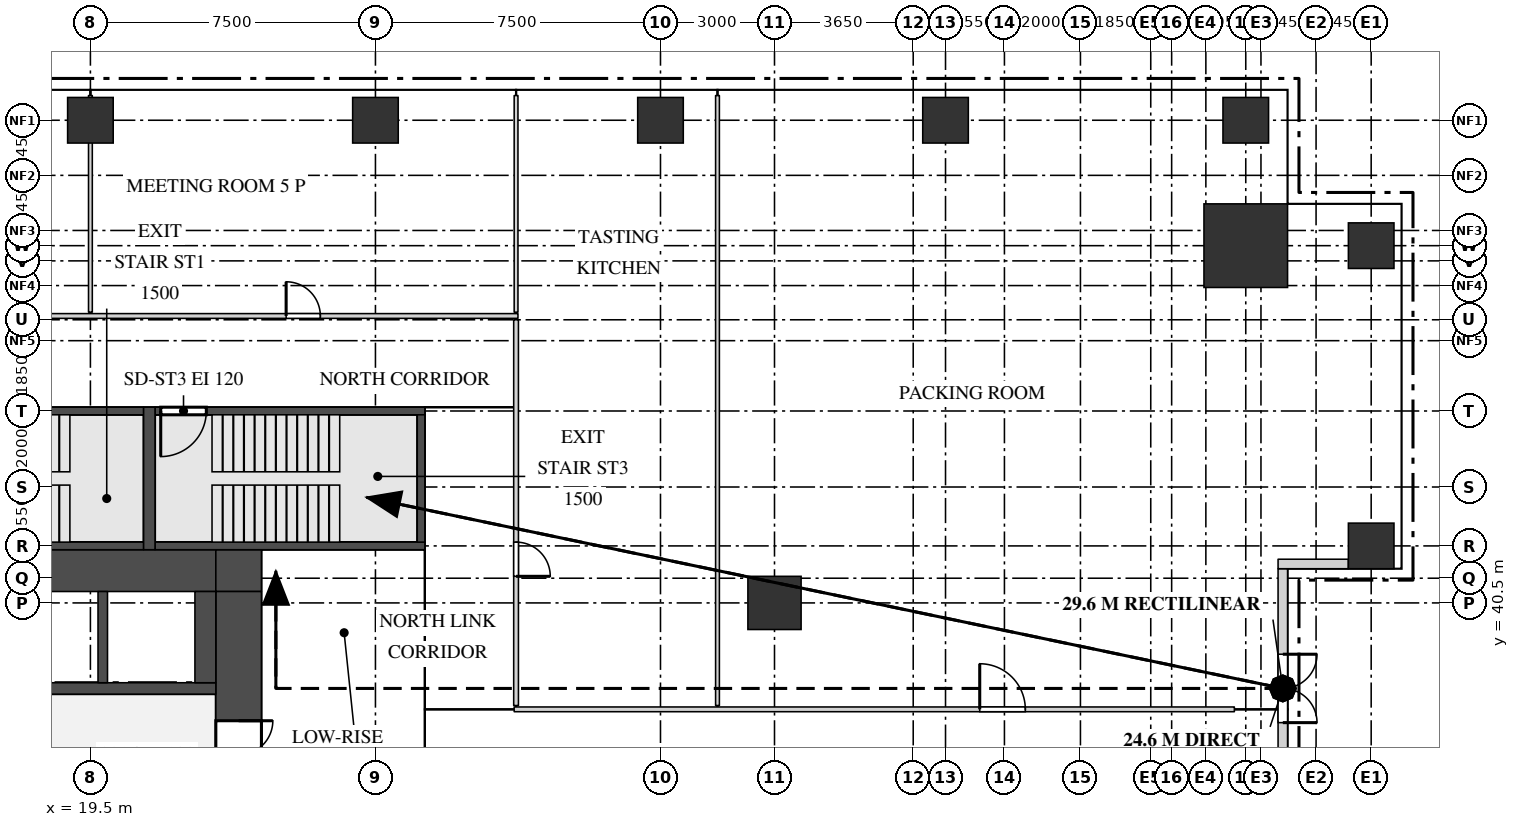
"""IFC4 building model, lengths in metres.
Left out: names, types, materials, properties, quantities, classifications, styles, units other than length and angle.
Written with IfcOpenShell. Run it as: python <this file> out.ifc"""

import sys

from ifc_helpers import new_model, si_unit, direction, frame, frame_2d, origin, origin_2d, place, context, subcontext, project, spatial, rectangle, extrude, source, transform, mapped, element, fill, save


model = new_model("IFC4")
c1 = context("Model", 3, precision=1e-05, world=origin(), true_north=direction((0.0, 1.0)))
c2 = subcontext(c1, "Body", "Model", "MODEL_VIEW")
j1 = project(units=[si_unit("LENGTHUNIT", "METRE"), si_unit("PLANEANGLEUNIT", "RADIAN")], contexts=[c1])
p1 = place(None, origin())
s1 = spatial("IfcSite", under=j1, at=p1, CompositionType="ELEMENT")
p2 = place(p1, origin())
s2 = spatial("IfcBuilding", under=s1, at=p2, CompositionType="ELEMENT")
p3 = place(p2, frame((0.0, 0.0, 60.0)))
s3 = spatial("IfcBuildingStorey", under=s2, at=p3, CompositionType="ELEMENT", Elevation=60.0)
m1 = source(origin(), c2, "Body", "SweptSolid", [
    extrude(rectangle(XDim=8.9, YDim=1.1, at=frame_2d((4.45, 0.0))), origin(), (0.0, 0.0, 1.0), 4.2),
])
p4 = place(p3, frame((13.9, 41.35, 0.0), z_axis=(0.0, 0.0, 1.0), x_axis=(1.0, 0.0, 0.0)))
e1 = element("IfcWall", 1, at=p4, inside=s3, PredefinedType="SHEAR", context=c2, shape_type="MappedRepresentation", body=[
    mapped(m1, transform((0.0, 0.0, 0.0))),
])
m2 = source(origin(), c2, "Body", "SweptSolid", [
    extrude(rectangle(XDim=1.2, YDim=1.1, at=frame_2d((0.6, 0.0))), origin(), (0.0, 0.0, 1.0), 4.2),
])
p5 = place(p3, frame((22.8, 41.35, 0.0), z_axis=(0.0, 0.0, 1.0), x_axis=(1.0, 0.0, 0.0)))
e2 = element("IfcWall", 2, at=p5, inside=s3, PredefinedType="SHEAR", context=c2, shape_type="MappedRepresentation", body=[
    mapped(m2, transform((0.0, 0.0, 0.0))),
])
m3 = source(origin(), c2, "Body", "SweptSolid", [
    extrude(rectangle(XDim=27.6, YDim=1.2, at=frame_2d((13.8, 0.0))), origin(), (0.0, 0.0, 1.0), 4.2),
])
p6 = place(p3, frame((23.4, 13.2, 0.0), z_axis=(0.0, 0.0, 1.0), x_axis=(0.0, 1.0, 0.0)))
e3 = element("IfcWall", 3, at=p6, inside=s3, PredefinedType="SHEAR", context=c2, shape_type="MappedRepresentation", body=[
    mapped(m3, transform((0.0, 0.0, 0.0))),
])
m4 = source(origin(), c2, "Body", "SweptSolid", [
    extrude(rectangle(XDim=1.8, YDim=2.1, at=frame_2d((0.9, 1.05))), frame((0.0, 0.61, 0.0), z_axis=(0.0, -1.0, 0.0), x_axis=(1.0, 0.0, 0.0)), (0.0, 0.0, 1.0), 1.22),
])
p7 = place(p6, frame((22.4, 0.0, 0.0)))
e4 = element("IfcOpeningElement", 4, at=p7, cuts=e3, PredefinedType="OPENING", context=c2, shape_type="MappedRepresentation", body=[
    mapped(m4, transform((0.0, 0.0, 0.0))),
])
m5 = source(origin(), c2, "Body", "SweptSolid", [
    extrude(rectangle(XDim=1.2, YDim=2.1, at=frame_2d((0.6, 1.05))), frame((0.0, 0.61, 0.0), z_axis=(0.0, -1.0, 0.0), x_axis=(1.0, 0.0, 0.0)), (0.0, 0.0, 1.0), 1.22),
])
p8 = place(p6, frame((12.15, 0.0, 0.0)))
e5 = element("IfcOpeningElement", 5, at=p8, cuts=e3, PredefinedType="OPENING", context=c2, shape_type="MappedRepresentation", body=[
    mapped(m5, transform((0.0, 0.0, 0.0))),
])
m6 = source(origin(), c2, "Body", "SweptSolid", [
    extrude(rectangle(XDim=0.9, YDim=2.1, at=frame_2d((0.45, 1.05))), frame((0.0, 0.61, 0.0), z_axis=(0.0, -1.0, 0.0), x_axis=(1.0, 0.0, 0.0)), (0.0, 0.0, 1.0), 1.22),
])
p9 = place(p6, frame((4.4, 0.0, 0.0)))
e6 = element("IfcOpeningElement", 6, at=p9, cuts=e3, PredefinedType="OPENING", context=c2, shape_type="MappedRepresentation", body=[
    mapped(m6, transform((0.0, 0.0, 0.0))),
])
m7 = source(origin(), c2, "Body", "SweptSolid", [
    extrude(rectangle(XDim=7.0, YDim=0.2, at=frame_2d((3.5, 0.0))), origin(), (0.0, 0.0, 1.0), 4.2),
])
p10 = place(p3, frame((13.9, 45.55, 0.0), z_axis=(0.0, 0.0, 1.0), x_axis=(1.0, 0.0, 0.0)))
e7 = element("IfcWall", 7, at=p10, inside=s3, PredefinedType="SHEAR", context=c2, shape_type="MappedRepresentation", body=[
    mapped(m7, transform((0.0, 0.0, 0.0))),
])
m8 = source(origin(), c2, "Body", "SweptSolid", [
    extrude(rectangle(XDim=1.2, YDim=2.1, at=frame_2d((0.6, 1.05))), frame((0.0, 0.11, 0.0), z_axis=(0.0, -1.0, 0.0), x_axis=(1.0, 0.0, 0.0)), (0.0, 0.0, 1.0), 0.22),
])
p11 = place(p10, frame((0.35, 0.0, 0.0)))
e8 = element("IfcOpeningElement", 8, at=p11, cuts=e7, PredefinedType="OPENING", context=c2, shape_type="MappedRepresentation", body=[
    mapped(m8, transform((0.0, 0.0, 0.0))),
])
p12 = place(p3, frame((13.9, 42.0, 0.0), z_axis=(0.0, 0.0, 1.0), x_axis=(1.0, 0.0, 0.0)))
e9 = element("IfcWall", 9, at=p12, inside=s3, PredefinedType="SHEAR", context=c2, shape_type="MappedRepresentation", body=[
    mapped(m7, transform((0.0, 0.0, 0.0))),
])
m9 = source(origin(), c2, "Body", "SweptSolid", [
    extrude(rectangle(XDim=7.1, YDim=0.2, at=frame_2d((3.55, 0.0))), origin(), (0.0, 0.0, 1.0), 4.2),
])
p13 = place(p3, frame((21.2, 45.55, 0.0), z_axis=(0.0, 0.0, 1.0), x_axis=(1.0, 0.0, 0.0)))
e10 = element("IfcWall", 10, at=p13, inside=s3, PredefinedType="SHEAR", context=c2, shape_type="MappedRepresentation", body=[
    mapped(m9, transform((0.0, 0.0, 0.0))),
])
p14 = place(p13, frame((0.15, 0.0, 0.0)))
e11 = element("IfcOpeningElement", 11, at=p14, cuts=e10, PredefinedType="OPENING", context=c2, shape_type="MappedRepresentation", body=[
    mapped(m8, transform((0.0, 0.0, 0.0))),
])
p15 = place(p3, frame((21.2, 42.0, 0.0), z_axis=(0.0, 0.0, 1.0), x_axis=(1.0, 0.0, 0.0)))
e12 = element("IfcWall", 12, at=p15, inside=s3, PredefinedType="SHEAR", context=c2, shape_type="MappedRepresentation", body=[
    mapped(m9, transform((0.0, 0.0, 0.0))),
])
m10 = source(origin(), c2, "Body", "SweptSolid", [
    extrude(rectangle(XDim=3.75, YDim=0.3, at=frame_2d((1.875, 0.0))), origin(), (0.0, 0.0, 1.0), 4.2),
])
p16 = place(p3, frame((21.05, 41.9, 0.0), z_axis=(0.0, 0.0, 1.0), x_axis=(0.0, 1.0, 0.0)))
e13 = element("IfcWall", 13, at=p16, inside=s3, PredefinedType="SHEAR", context=c2, shape_type="MappedRepresentation", body=[
    mapped(m10, transform((0.0, 0.0, 0.0))),
])
m11 = source(origin(), c2, "Body", "SweptSolid", [
    extrude(rectangle(XDim=3.35, YDim=0.2, at=frame_2d((1.675, 0.0))), origin(), (0.0, 0.0, 1.0), 4.2),
])
p17 = place(p3, frame((28.2, 42.1, 0.0), z_axis=(0.0, 0.0, 1.0), x_axis=(0.0, 1.0, 0.0)))
e14 = element("IfcWall", 14, at=p17, inside=s3, PredefinedType="SHEAR", context=c2, shape_type="MappedRepresentation", body=[
    mapped(m11, transform((0.0, 0.0, 0.0))),
])
m12 = source(origin(), c2, "Body", "SweptSolid", [
    extrude(rectangle(XDim=15.6, YDim=0.3, at=frame_2d((7.8, 0.0))), origin(), (0.0, 0.0, 1.0), 4.2),
])
p18 = place(p3, frame((7.2, 38.25, 0.0), z_axis=(0.0, 0.0, 1.0), x_axis=(1.0, 0.0, 0.0)))
e15 = element("IfcWall", 15, at=p18, inside=s3, PredefinedType="STANDARD", context=c2, shape_type="MappedRepresentation", body=[
    mapped(m12, transform((0.0, 0.0, 0.0))),
])
m13 = source(origin(), c2, "Body", "SweptSolid", [
    extrude(rectangle(XDim=1.2, YDim=2.1, at=frame_2d((0.6, 1.05))), frame((0.0, 0.16, 0.0), z_axis=(0.0, -1.0, 0.0), x_axis=(1.0, 0.0, 0.0)), (0.0, 0.0, 1.0), 0.32),
])
p19 = place(p18, frame((0.55, 0.0, 0.0)))
e16 = element("IfcOpeningElement", 16, at=p19, cuts=e15, PredefinedType="OPENING", context=c2, shape_type="MappedRepresentation", body=[
    mapped(m13, transform((0.0, 0.0, 0.0))),
])
p20 = place(p18, frame((3.1, 0.0, 0.0)))
e17 = element("IfcOpeningElement", 17, at=p20, cuts=e15, PredefinedType="OPENING", context=c2, shape_type="MappedRepresentation", body=[
    mapped(m13, transform((0.0, 0.0, 0.0))),
])
p21 = place(p18, frame((5.65, 0.0, 0.0)))
e18 = element("IfcOpeningElement", 18, at=p21, cuts=e15, PredefinedType="OPENING", context=c2, shape_type="MappedRepresentation", body=[
    mapped(m13, transform((0.0, 0.0, 0.0))),
])
p22 = place(p18, frame((8.2, 0.0, 0.0)))
e19 = element("IfcOpeningElement", 19, at=p22, cuts=e15, PredefinedType="OPENING", context=c2, shape_type="MappedRepresentation", body=[
    mapped(m13, transform((0.0, 0.0, 0.0))),
])
m14 = source(origin(), c2, "Body", "SweptSolid", [
    extrude(rectangle(XDim=2.4, YDim=0.25, at=frame_2d((1.2, 0.0))), origin(), (0.0, 0.0, 1.0), 4.2),
])
p23 = place(p3, frame((19.825, 38.4, 0.0), z_axis=(0.0, 0.0, 1.0), x_axis=(0.0, 1.0, 0.0)))
e20 = element("IfcWall", 20, at=p23, inside=s3, PredefinedType="STANDARD", context=c2, shape_type="MappedRepresentation", body=[
    mapped(m14, transform((0.0, 0.0, 0.0))),
])
m15 = source(origin(), c2, "Body", "SweptSolid", [
    extrude(rectangle(XDim=2.4, YDim=0.55, at=frame_2d((1.2, 0.0))), origin(), (0.0, 0.0, 1.0), 4.2),
])
p24 = place(p3, frame((22.525, 38.4, 0.0), z_axis=(0.0, 0.0, 1.0), x_axis=(0.0, 1.0, 0.0)))
e21 = element("IfcWall", 21, at=p24, inside=s3, PredefinedType="STANDARD", context=c2, shape_type="MappedRepresentation", body=[
    mapped(m15, transform((0.0, 0.0, 0.0))),
])
m16 = source(origin(), c2, "Body", "SweptSolid", [
    extrude(rectangle(XDim=2.2, YDim=2.2, at=origin_2d()), origin(), (0.0, 0.0, 1.0), 4.5),
])
p25 = place(p3, frame((49.9, 49.9, 0.0), z_axis=(0.0, 0.0, 1.0), x_axis=(1.0, 0.0, 0.0)))
e22 = element("IfcColumn", 22, at=p25, inside=s3, PredefinedType="COLUMN", context=c2, shape_type="MappedRepresentation", body=[
    mapped(m16, transform((0.0, 0.0, 0.0))),
])
m17 = source(origin(), c2, "Body", "SweptSolid", [
    extrude(rectangle(XDim=1.2, YDim=1.2, at=origin_2d()), origin(), (0.0, 0.0, 1.0), 4.2),
])
for number, where, z_axis, x_axis in (
    (23, (53.2, 42.0, 0.0), (0.0, 0.0, 1.0), (1.0, 0.0, 0.0)),
    (24, (53.2, 49.9, 0.0), (0.0, 0.0, 1.0), (1.0, 0.0, 0.0)),
    (25, (19.5, 53.2, 0.0), (0.0, 0.0, 1.0), (1.0, 0.0, 0.0)),
    (26, (27.0, 53.2, 0.0), (0.0, 0.0, 1.0), (1.0, 0.0, 0.0)),
    (27, (34.5, 53.2, 0.0), (0.0, 0.0, 1.0), (1.0, 0.0, 0.0)),
    (28, (42.0, 53.2, 0.0), (0.0, 0.0, 1.0), (1.0, 0.0, 0.0)),
    (29, (49.9, 53.2, 0.0), (0.0, 0.0, 1.0), (1.0, 0.0, 0.0)),
):
    element("IfcColumn", number, at=place(p3, frame(where, z_axis=z_axis, x_axis=x_axis)), inside=s3, PredefinedType="COLUMN", context=c2, shape_type="MappedRepresentation", body=[
        mapped(m17, transform((0.0, 0.0, 0.0))),
    ])
m18 = source(origin(), c2, "Body", "SweptSolid", [
    extrude(rectangle(XDim=1.4, YDim=1.4, at=origin_2d()), origin(), (0.0, 0.0, 1.0), 4.2),
])
p26 = place(p3, frame((37.5, 40.5, 0.0), z_axis=(0.0, 0.0, 1.0), x_axis=(1.0, 0.0, 0.0)))
e30 = element("IfcColumn", 30, at=p26, inside=s3, PredefinedType="COLUMN", context=c2, shape_type="MappedRepresentation", body=[
    mapped(m18, transform((0.0, 0.0, 0.0))),
])
m19 = source(origin(), c2, "Body", "SweptSolid", [
    extrude(rectangle(XDim=6.3, YDim=0.25, at=frame_2d((3.15, 0.0))), origin(), (0.0, 0.0, 1.0), 3.6),
])
p27 = place(p3, frame((50.875, 35.1, 0.0), z_axis=(0.0, 0.0, 1.0), x_axis=(0.0, 1.0, 0.0)))
e31 = element("IfcWall", 31, at=p27, inside=s3, PredefinedType="SOLIDWALL", context=c2, shape_type="MappedRepresentation", body=[
    mapped(m19, transform((0.0, 0.0, 0.0))),
])
m20 = source(origin(), c2, "Body", "SweptSolid", [
    extrude(rectangle(XDim=1.6, YDim=2.4, at=frame_2d((0.8, 1.2))), frame((0.0, 0.135, 0.0), z_axis=(0.0, -1.0, 0.0), x_axis=(1.0, 0.0, 0.0)), (0.0, 0.0, 1.0), 0.27),
])
p28 = place(p27, frame((0.35, 0.0, 0.0)))
e32 = element("IfcOpeningElement", 32, at=p28, cuts=e31, PredefinedType="OPENING", context=c2, shape_type="MappedRepresentation", body=[
    mapped(m20, transform((0.0, 0.0, 0.0))),
])
p29 = place(p27, frame((4.35, 0.0, 0.0)))
e33 = element("IfcOpeningElement", 33, at=p29, cuts=e31, PredefinedType="OPENING", context=c2, shape_type="MappedRepresentation", body=[
    mapped(m20, transform((0.0, 0.0, 0.0))),
])
m21 = source(origin(), c2, "Body", "SweptSolid", [
    extrude(rectangle(XDim=1.8, YDim=2.4, at=frame_2d((0.9, 1.2))), frame((0.0, 0.135, 0.0), z_axis=(0.0, -1.0, 0.0), x_axis=(1.0, 0.0, 0.0)), (0.0, 0.0, 1.0), 0.27),
])
p30 = place(p27, frame((2.25, 0.0, 0.0)))
e34 = element("IfcOpeningElement", 34, at=p30, cuts=e31, PredefinedType="OPENING", context=c2, shape_type="MappedRepresentation", body=[
    mapped(m21, transform((0.0, 0.0, 0.0))),
])
m22 = source(origin(), c2, "Body", "SweptSolid", [
    extrude(rectangle(XDim=1.85, YDim=0.25, at=frame_2d((0.925, 0.0))), origin(), (0.0, 0.0, 1.0), 3.6),
])
p31 = place(p3, frame((52.6, 41.525, 0.0), z_axis=(0.0, 0.0, 1.0), x_axis=(-1.0, 0.0, 0.0)))
e35 = element("IfcWall", 35, at=p31, inside=s3, PredefinedType="SOLIDWALL", context=c2, shape_type="MappedRepresentation", body=[
    mapped(m22, transform((0.0, 0.0, 0.0))),
])
m23 = source(origin(), c2, "Body", "SweptSolid", [
    extrude(rectangle(XDim=18.95, YDim=0.125, at=frame_2d((9.475, 0.0))), origin(), (0.0, 0.0, 1.0), 4.3),
])
p32 = place(p3, frame((30.65, 37.7, 0.0), z_axis=(0.0, 0.0, 1.0), x_axis=(1.0, 0.0, 0.0)))
e36 = element("IfcWall", 36, at=p32, inside=s3, PredefinedType="PARTITIONING", context=c2, shape_type="MappedRepresentation", body=[
    mapped(m23, transform((0.0, 0.0, 0.0))),
])
m24 = source(origin(), c2, "Body", "SweptSolid", [
    extrude(rectangle(XDim=1.2, YDim=2.1, at=frame_2d((0.6, 1.05))), frame((0.0, 0.073, 0.0), z_axis=(0.0, -1.0, 0.0), x_axis=(1.0, 0.0, 0.0)), (0.0, 0.0, 1.0), 0.145),
])
p33 = place(p32, frame((12.25, 0.0, 0.0)))
e37 = element("IfcOpeningElement", 37, at=p33, cuts=e36, PredefinedType="OPENING", context=c2, shape_type="MappedRepresentation", body=[
    mapped(m24, transform((0.0, 0.0, 0.0))),
])
m25 = source(origin(), c2, "Body", "SweptSolid", [
    extrude(rectangle(XDim=10.15, YDim=0.125, at=frame_2d((5.075, 0.0))), origin(), (0.0, 0.0, 1.0), 4.3),
])
p34 = place(p3, frame((30.7, 37.8, 0.0), z_axis=(0.0, 0.0, 1.0), x_axis=(0.0, 1.0, 0.0)))
e38 = element("IfcWall", 38, at=p34, inside=s3, PredefinedType="PARTITIONING", context=c2, shape_type="MappedRepresentation", body=[
    mapped(m25, transform((0.0, 0.0, 0.0))),
])
m26 = source(origin(), c2, "Body", "SweptSolid", [
    extrude(rectangle(XDim=0.9, YDim=2.1, at=frame_2d((0.45, 1.05))), frame((0.0, 0.073, 0.0), z_axis=(0.0, -1.0, 0.0), x_axis=(1.0, 0.0, 0.0)), (0.0, 0.0, 1.0), 0.145),
])
p35 = place(p34, frame((3.4, 0.0, 0.0)))
e39 = element("IfcOpeningElement", 39, at=p35, cuts=e38, PredefinedType="OPENING", context=c2, shape_type="MappedRepresentation", body=[
    mapped(m26, transform((0.0, 0.0, 0.0))),
])
m27 = source(origin(), c2, "Body", "SweptSolid", [
    extrude(rectangle(XDim=16.05, YDim=0.1, at=frame_2d((8.025, 0.0))), origin(), (0.0, 0.0, 1.0), 4.3),
])
p36 = place(p3, frame((36.0, 37.8, 0.0), z_axis=(0.0, 0.0, 1.0), x_axis=(0.0, 1.0, 0.0)))
e40 = element("IfcWall", 40, at=p36, inside=s3, PredefinedType="PARTITIONING", context=c2, shape_type="MappedRepresentation", body=[
    mapped(m27, transform((0.0, 0.0, 0.0))),
])
m28 = source(origin(), c2, "Body", "SweptSolid", [
    extrude(rectangle(XDim=26.6, YDim=0.125, at=frame_2d((13.3, 0.0))), origin(), (0.0, 0.0, 1.0), 4.3),
])
p37 = place(p3, frame((4.15, 48.05, 0.0), z_axis=(0.0, 0.0, 1.0), x_axis=(1.0, 0.0, 0.0)))
e41 = element("IfcWall", 41, at=p37, inside=s3, PredefinedType="PARTITIONING", context=c2, shape_type="MappedRepresentation", body=[
    mapped(m28, transform((0.0, 0.0, 0.0))),
])
p38 = place(p37, frame((7.25, 0.0, 0.0)))
e42 = element("IfcOpeningElement", 42, at=p38, cuts=e41, PredefinedType="OPENING", context=c2, shape_type="MappedRepresentation", body=[
    mapped(m26, transform((0.0, 0.0, 0.0))),
])
p39 = place(p37, frame((20.5, 0.0, 0.0)))
e43 = element("IfcOpeningElement", 43, at=p39, cuts=e41, PredefinedType="OPENING", context=c2, shape_type="MappedRepresentation", body=[
    mapped(m26, transform((0.0, 0.0, 0.0))),
])
m29 = source(origin(), c2, "Body", "SweptSolid", [
    extrude(rectangle(XDim=5.7, YDim=0.1, at=frame_2d((2.85, 0.0))), origin(), (0.0, 0.0, 1.0), 3.84),
])
p40 = place(p3, frame((19.5, 48.15, 0.0), z_axis=(0.0, 0.0, 1.0), x_axis=(0.0, 1.0, 0.0)))
e44 = element("IfcWall", 44, at=p40, inside=s3, PredefinedType="PARTITIONING", context=c2, shape_type="MappedRepresentation", body=[
    mapped(m29, transform((0.0, 0.0, 0.0))),
])
m30 = source(origin(), c2, "Body", "SweptSolid", [
    extrude(rectangle(XDim=5.7, YDim=0.1, at=frame_2d((2.85, 0.0))), origin(), (0.0, 0.0, 1.0), 4.3),
])
p41 = place(p3, frame((30.7, 48.15, 0.0), z_axis=(0.0, 0.0, 1.0), x_axis=(0.0, 1.0, 0.0)))
e45 = element("IfcWall", 45, at=p41, inside=s3, PredefinedType="PARTITIONING", context=c2, shape_type="MappedRepresentation", body=[
    mapped(m30, transform((0.0, 0.0, 0.0))),
])
m31 = source(origin(), c2, "Body", "SweptSolid", [
    extrude(rectangle(XDim=1.6, YDim=2.4, at=frame_2d((0.8, 1.2))), frame((0.0, 0.03, 0.0), z_axis=(0.0, -1.0, 0.0), x_axis=(1.0, 0.0, 0.0)), (0.0, 0.0, 1.0), 0.06),
])
p42 = place(p28, origin())
e46 = element("IfcWindow", 46, at=p42, inside=s3, PartitioningType="SINGLE_PANEL", PredefinedType="WINDOW", context=c2, shape_type="MappedRepresentation", body=[
    mapped(m31, transform((0.0, 0.0, 0.0))),
])
fill(e32, e46)
p43 = place(p29, origin())
e47 = element("IfcWindow", 47, at=p43, inside=s3, PartitioningType="SINGLE_PANEL", PredefinedType="WINDOW", context=c2, shape_type="MappedRepresentation", body=[
    mapped(m31, transform((0.0, 0.0, 0.0))),
])
fill(e33, e47)
m32 = source(origin(), c2, "Body", "SweptSolid", [
    extrude(rectangle(XDim=1.8, YDim=2.4, at=frame_2d((0.9, 1.2))), frame((0.0, 0.025, 0.0), z_axis=(0.0, -1.0, 0.0), x_axis=(1.0, 0.0, 0.0)), (0.0, 0.0, 1.0), 0.05),
])
p44 = place(p30, origin())
e48 = element("IfcDoor", 48, at=p44, inside=s3, OperationType="DOUBLE_DOOR_DOUBLE_SWING", PredefinedType="DOOR", context=c2, shape_type="MappedRepresentation", body=[
    mapped(m32, transform((0.0, 0.0, 0.0))),
])
fill(e34, e48)
m33 = source(origin(), c2, "Body", "SweptSolid", [
    extrude(rectangle(XDim=1.8, YDim=2.1, at=frame_2d((0.9, 1.05))), frame((0.0, 0.55, 0.0), z_axis=(0.0, -1.0, 0.0), x_axis=(1.0, 0.0, 0.0)), (0.0, 0.0, 1.0), 1.1),
])
p45 = place(p7, origin())
e49 = element("IfcDoor", 49, at=p45, inside=s3, OperationType="DOUBLE_DOOR_SINGLE_SWING", PredefinedType="DOOR", context=c2, shape_type="MappedRepresentation", body=[
    mapped(m33, transform((0.0, 0.0, 0.0))),
])
fill(e4, e49)
m34 = source(origin(), c2, "Body", "SweptSolid", [
    extrude(rectangle(XDim=0.9, YDim=2.1, at=frame_2d((0.45, 1.05))), frame((0.0, 0.025, 0.0), z_axis=(0.0, -1.0, 0.0), x_axis=(1.0, 0.0, 0.0)), (0.0, 0.0, 1.0), 0.05),
])
p46 = place(p35, origin())
e50 = element("IfcDoor", 50, at=p46, inside=s3, OperationType="SINGLE_SWING_LEFT", PredefinedType="DOOR", context=c2, shape_type="MappedRepresentation", body=[
    mapped(m34, transform((0.0, 0.0, 0.0))),
])
fill(e39, e50)
m35 = source(origin(), c2, "Body", "SweptSolid", [
    extrude(rectangle(XDim=1.2, YDim=2.1, at=frame_2d((0.6, 1.05))), frame((0.0, 0.025, 0.0), z_axis=(0.0, -1.0, 0.0), x_axis=(1.0, 0.0, 0.0)), (0.0, 0.0, 1.0), 0.05),
])
p47 = place(p33, origin())
e51 = element("IfcDoor", 51, at=p47, inside=s3, OperationType="SINGLE_SWING_RIGHT", PredefinedType="DOOR", context=c2, shape_type="MappedRepresentation", body=[
    mapped(m35, transform((0.0, 0.0, 0.0))),
])
fill(e37, e51)
p48 = place(p39, origin())
e52 = element("IfcDoor", 52, at=p48, inside=s3, OperationType="SINGLE_SWING_RIGHT", PredefinedType="DOOR", context=c2, shape_type="MappedRepresentation", body=[
    mapped(m34, transform((0.0, 0.0, 0.0))),
])
fill(e43, e52)
p49 = place(p14, origin())
e53 = element("IfcDoor", 53, at=p49, inside=s3, OperationType="SINGLE_SWING_LEFT", PredefinedType="DOOR", context=c2, shape_type="MappedRepresentation", body=[
    mapped(m35, transform((0.0, 0.0, 0.0))),
])
fill(e11, e53)
save(model, sys.argv[1])
